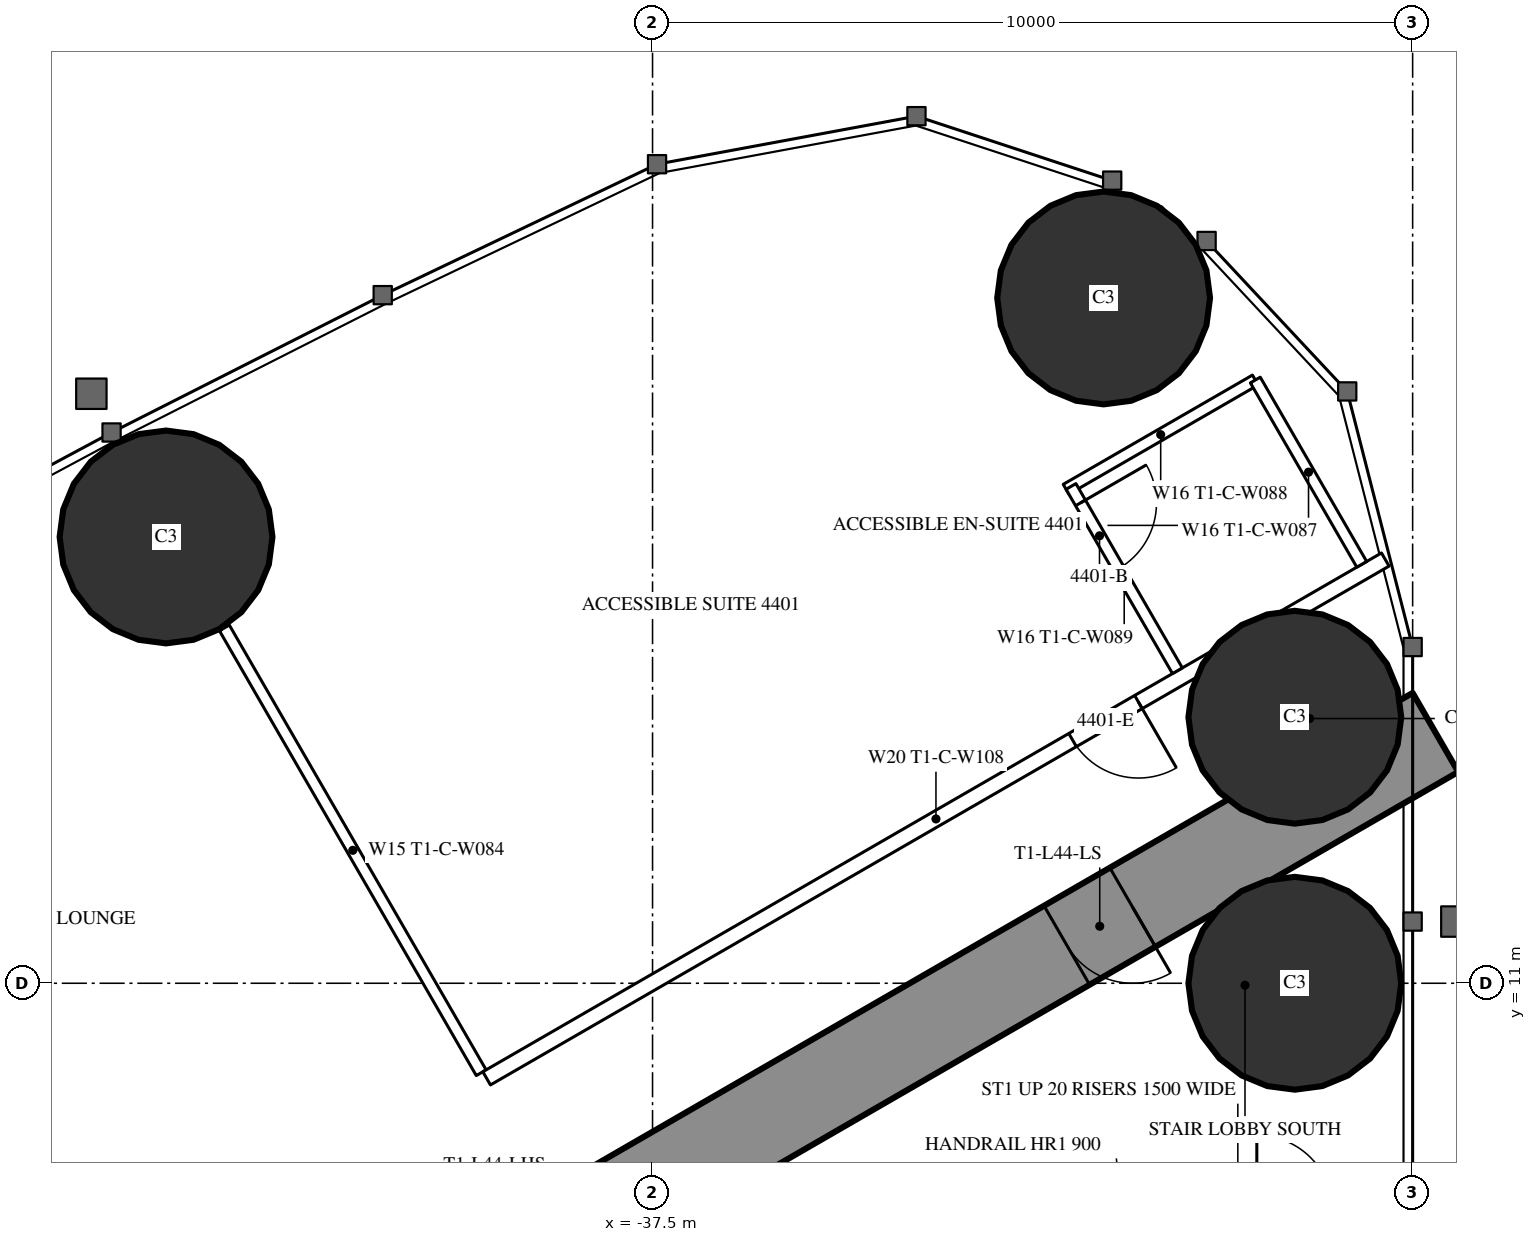
"""IFC4 building model, lengths in metres.
Left out: names, types, materials, properties, quantities, classifications, styles, units other than length and angle.
Written with IfcOpenShell. Run it as: python <this file> out.ifc"""

import sys

from ifc_helpers import new_model, si_unit, direction, frame, frame_2d, origin, origin_2d, place, context, subcontext, project, spatial, rectangle, circle, extrude, element, fill, save


model = new_model("IFC4")
c1 = context("Model", 3, precision=1e-05, world=origin(), true_north=direction((0.0, 1.0)))
c2 = subcontext(c1, "Body", "Model", "MODEL_VIEW")
j1 = project(units=[si_unit("LENGTHUNIT", "METRE"), si_unit("PLANEANGLEUNIT", "RADIAN")], contexts=[c1])
p1 = place(None, origin())
s1 = spatial("IfcSite", under=j1, at=p1, CompositionType="ELEMENT")
p2 = place(p1, origin())
s2 = spatial("IfcBuilding", under=s1, at=p2, CompositionType="ELEMENT")
p3 = place(p2, frame((0.0, 0.0, 166.8)))
s3 = spatial("IfcBuildingStorey", under=s2, at=p3, CompositionType="ELEMENT", Elevation=166.8)
for number, where, z_axis, x_axis in (
    (1, (-31.565, 20.016, 0.0), (0.0, 0.0, 1.0), (1.0, 0.0, 0.0)),
    (2, (-29.05, 11.0, 0.0), (0.0, 0.0, 1.0), (1.0, 0.0, 0.0)),
    (3, (-29.05, 14.5, 0.0), (0.0, 0.0, 1.0), (1.0, 0.0, 0.0)),
    (4, (-43.9, 16.871, 0.0), (0.0, 0.0, 1.0), (1.0, 0.0, 0.0)),
):
    element("IfcColumn", number, at=place(p3, frame(where, z_axis=z_axis, x_axis=x_axis)), inside=s3, PredefinedType="COLUMN", context=c2, shape_type="SweptSolid", body=[
        extrude(circle(Radius=1.4, at=origin_2d()), origin(), (0.0, 0.0, 1.0), 3.5),
    ])
p4 = place(p3, frame((-27.2, 14.3, 0.0), z_axis=(0.0, 0.0, 1.0), x_axis=(-0.866026593062, -0.499997940104, 0.0)))
e5 = element("IfcWall", 5, at=p4, inside=s3, PredefinedType="SHEAR", context=c2, shape_type="SweptSolid", body=[
    extrude(rectangle(XDim=28.946, YDim=1.2, at=frame_2d((14.473, 0.0))), origin(), (0.0, 0.0, 1.0), 3.5),
])
p5 = place(p4, frame((4.6, 0.0, 0.0)))
e6 = element("IfcOpeningElement", 6, at=p5, cuts=e5, PredefinedType="OPENING", context=c2, shape_type="SweptSolid", body=[
    extrude(rectangle(XDim=1.0, YDim=2.2, at=frame_2d((0.5, 1.1))), frame((0.0, 0.61, 0.0), z_axis=(0.0, -1.0, 0.0), x_axis=(1.0, 0.0, 0.0)), (0.0, 0.0, 1.0), 1.22),
])
p6 = place(p4, frame((13.395, 0.0, 0.0)))
e7 = element("IfcOpeningElement", 7, at=p6, cuts=e5, PredefinedType="OPENING", context=c2, shape_type="SweptSolid", body=[
    extrude(rectangle(XDim=1.8, YDim=2.2, at=frame_2d((0.9, 1.1))), frame((0.0, 0.61, 0.0), z_axis=(0.0, -1.0, 0.0), x_axis=(1.0, 0.0, 0.0)), (0.0, 0.0, 1.0), 1.22),
])
p7 = place(p3, frame((-39.754, 9.823, 0.0), z_axis=(0.0, 0.0, 1.0), x_axis=(-0.499997670926, 0.866026748472, 0.0)))
e8 = element("IfcWall", 8, at=p7, inside=s3, PredefinedType="PARTITIONING", context=c2, shape_type="SweptSolid", body=[
    extrude(rectangle(XDim=6.757, YDim=0.15, at=frame_2d((3.379, 0.0))), origin(), (0.0, 0.0, 1.0), 2.3),
])
p8 = place(p3, frame((-27.86, 16.575, 0.0), z_axis=(0.0, 0.0, 1.0), x_axis=(-0.866026850238, -0.499997494661, 0.0)))
e9 = element("IfcWall", 9, at=p8, inside=s3, PredefinedType="PARTITIONING", context=c2, shape_type="SweptSolid", body=[
    extrude(rectangle(XDim=13.651, YDim=0.2, at=frame_2d((6.826, 0.0))), origin(), (0.0, 0.0, 1.0), 3.25),
])
p9 = place(p8, frame((3.75, 0.0, 0.0)))
e10 = element("IfcOpeningElement", 10, at=p9, cuts=e9, PredefinedType="OPENING", context=c2, shape_type="SweptSolid", body=[
    extrude(rectangle(XDim=1.0, YDim=2.2, at=frame_2d((0.5, 1.1))), frame((0.0, 0.11, 0.0), z_axis=(0.0, -1.0, 0.0), x_axis=(1.0, 0.0, 0.0)), (0.0, 0.0, 1.0), 0.22),
])
p10 = place(p3, frame((-29.57, 18.936, 0.0), z_axis=(0.0, 0.0, 1.0), x_axis=(-0.866018712932, -0.500011588718, 0.0)))
e11 = element("IfcWall", 11, at=p10, inside=s3, PredefinedType="PARTITIONING", context=c2, shape_type="SweptSolid", body=[
    extrude(rectangle(XDim=2.875, YDim=0.15, at=frame_2d((1.438, 0.0))), origin(), (0.0, 0.0, 1.0), 3.25),
])
p11 = place(p3, frame((-30.595, 15.111, 0.0), z_axis=(0.0, 0.0, 1.0), x_axis=(-0.49998411664, 0.866034573852, 0.0)))
e12 = element("IfcWall", 12, at=p11, inside=s3, PredefinedType="PARTITIONING", context=c2, shape_type="SweptSolid", body=[
    extrude(rectangle(XDim=2.8, YDim=0.15, at=frame_2d((1.4, 0.0))), origin(), (0.0, 0.0, 1.0), 3.25),
])
p12 = place(p11, frame((1.55, 0.0, 0.0)))
e13 = element("IfcOpeningElement", 13, at=p12, cuts=e12, PredefinedType="OPENING", context=c2, shape_type="SweptSolid", body=[
    extrude(rectangle(XDim=1.0, YDim=2.2, at=frame_2d((0.5, 1.1))), frame((0.0, 0.085, 0.0), z_axis=(0.0, -1.0, 0.0), x_axis=(1.0, 0.0, 0.0)), (0.0, 0.0, 1.0), 0.17),
])
p13 = place(p3, frame((-28.17, 16.511, 0.0), z_axis=(0.0, 0.0, 1.0), x_axis=(-0.49994636267, 0.866056369097, 0.0)))
e14 = element("IfcWall", 14, at=p13, inside=s3, PredefinedType="PARTITIONING", context=c2, shape_type="SweptSolid", body=[
    extrude(rectangle(XDim=2.8, YDim=0.15, at=frame_2d((1.4, 0.0))), origin(), (0.0, 0.0, 1.0), 3.25),
])
p14 = place(p12, origin())
e15 = element("IfcDoor", 15, at=p14, inside=s3, OperationType="SINGLE_SWING_RIGHT", PredefinedType="DOOR", context=c2, shape_type="SweptSolid", body=[
    extrude(rectangle(XDim=1.0, YDim=2.2, at=frame_2d((0.5, 1.1))), frame((0.0, 0.025, 0.0), z_axis=(0.0, -1.0, 0.0), x_axis=(1.0, 0.0, 0.0)), (0.0, 0.0, 1.0), 0.05),
])
fill(e13, e15)
p15 = place(p9, origin())
e16 = element("IfcDoor", 16, at=p15, inside=s3, OperationType="SINGLE_SWING_LEFT", PredefinedType="DOOR", context=c2, shape_type="SweptSolid", body=[
    extrude(rectangle(XDim=1.0, YDim=2.2, at=frame_2d((0.5, 1.1))), frame((0.0, 0.025, 0.0), z_axis=(0.0, -1.0, 0.0), x_axis=(1.0, 0.0, 0.0)), (0.0, 0.0, 1.0), 0.05),
])
fill(e10, e16)
p16 = place(p5, origin())
e17 = element("IfcDoor", 17, at=p16, inside=s3, OperationType="SINGLE_SWING_LEFT", PredefinedType="DOOR", context=c2, shape_type="SweptSolid", body=[
    extrude(rectangle(XDim=1.0, YDim=2.2, at=frame_2d((0.5, 1.1))), frame((0.0, 0.025, 0.0), z_axis=(0.0, -1.0, 0.0), x_axis=(1.0, 0.0, 0.0)), (0.0, 0.0, 1.0), 0.05),
])
fill(e6, e17)
save(model, sys.argv[1])
